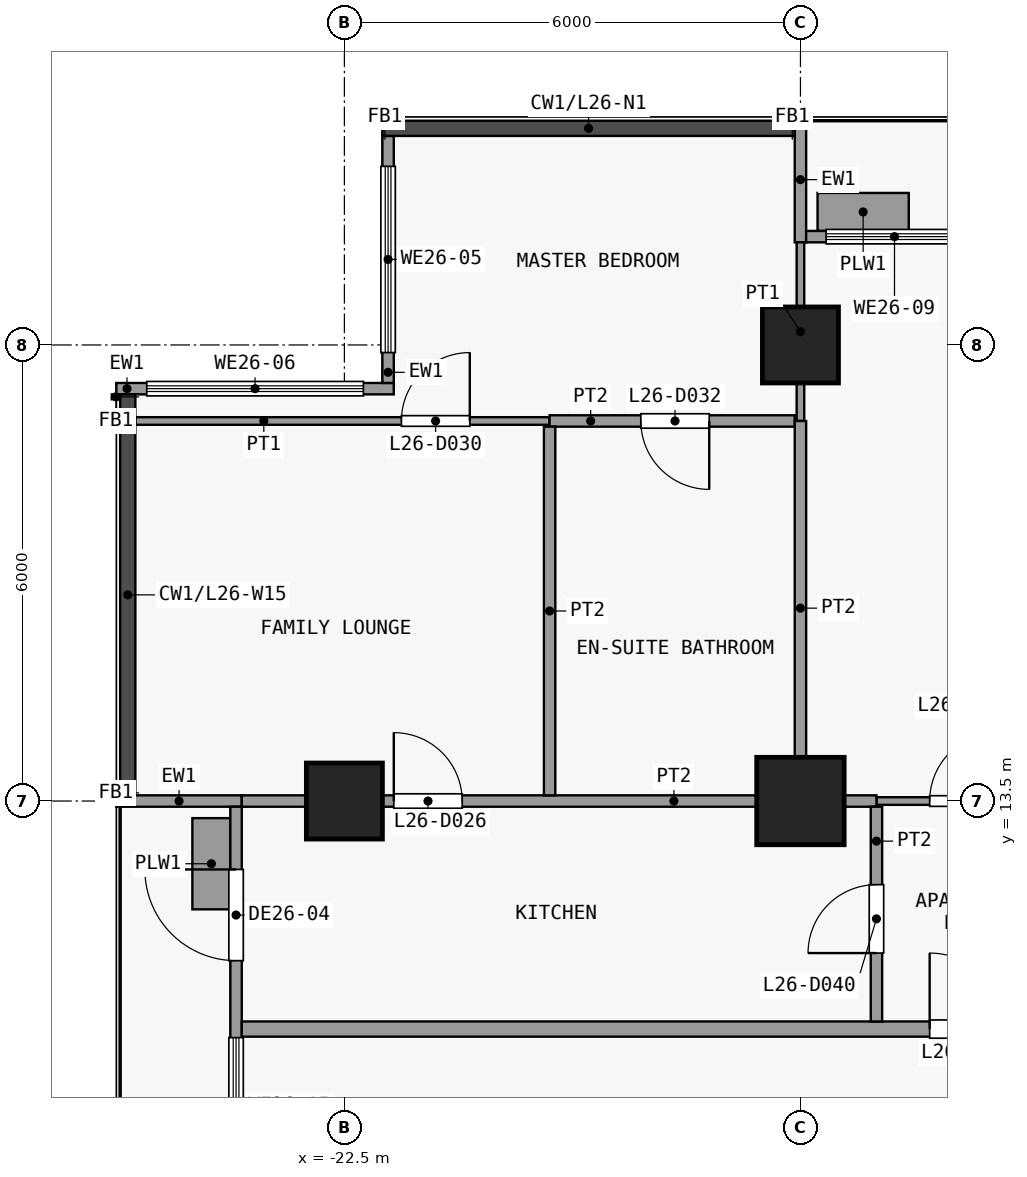
"""IFC4 building model, lengths in metres.
Left out: names, types, materials, properties, quantities, classifications, styles, units other than length and angle.
Written with IfcOpenShell. Run it as: python <this file> out.ifc"""

import sys

from ifc_helpers import new_model, si_unit, direction, frame, frame_2d, origin, origin_2d, place, context, subcontext, project, spatial, rectangle, extrude, element, fill, save


model = new_model("IFC4")
c1 = context("Model", 3, precision=1e-05, world=origin(), true_north=direction((0.0, 1.0)))
c2 = subcontext(c1, "Body", "Model", "MODEL_VIEW")
j1 = project(units=[si_unit("LENGTHUNIT", "METRE"), si_unit("PLANEANGLEUNIT", "RADIAN")], contexts=[c1])
p1 = place(None, origin())
s1 = spatial("IfcSite", under=j1, at=p1, CompositionType="ELEMENT")
p2 = place(p1, origin())
s2 = spatial("IfcBuilding", under=s1, at=p2, CompositionType="ELEMENT")
p3 = place(p2, frame((0.0, 0.0, 106.3)))
s3 = spatial("IfcBuildingStorey", under=s2, at=p3, CompositionType="ELEMENT", Elevation=106.3)
p4 = place(p3, frame((-22.5, 13.5, 0.0), z_axis=(0.0, 0.0, 1.0), x_axis=(1.0, 0.0, 0.0)))
e1 = element("IfcColumn", 1, at=p4, inside=s3, PredefinedType="COLUMN", context=c2, shape_type="SweptSolid", body=[
    extrude(rectangle(XDim=1.0, YDim=1.0, at=origin_2d()), origin(), (0.0, 0.0, 1.0), 3.6),
])
p5 = place(p3, frame((-16.5, 13.5, 0.0), z_axis=(0.0, 0.0, 1.0), x_axis=(1.0, 0.0, 0.0)))
e2 = element("IfcColumn", 2, at=p5, inside=s3, PredefinedType="COLUMN", context=c2, shape_type="SweptSolid", body=[
    extrude(rectangle(XDim=1.15, YDim=1.15, at=origin_2d()), origin(), (0.0, 0.0, 1.0), 3.6),
])
p6 = place(p3, frame((-16.5, 19.5, 0.0), z_axis=(0.0, 0.0, 1.0), x_axis=(1.0, 0.0, 0.0)))
e3 = element("IfcColumn", 3, at=p6, inside=s3, PredefinedType="COLUMN", context=c2, shape_type="SweptSolid", body=[
    extrude(rectangle(XDim=1.0, YDim=1.0, at=origin_2d()), origin(), (0.0, 0.0, 1.0), 3.6),
])
p7 = place(p3, frame((-21.925, 19.0, 0.0), z_axis=(0.0, 0.0, 1.0), x_axis=(0.0, 1.0, 0.0)))
e4 = element("IfcWall", 4, at=p7, inside=s3, PredefinedType="SOLIDWALL", context=c2, shape_type="SweptSolid", body=[
    extrude(rectangle(XDim=3.25, YDim=0.15, at=frame_2d((1.625, 0.0))), origin(), (0.0, 0.0, 1.0), 3.3),
])
p8 = place(p7, frame((0.4, 0.0, 0.9)))
e5 = element("IfcOpeningElement", 5, at=p8, cuts=e4, PredefinedType="OPENING", context=c2, shape_type="SweptSolid", body=[
    extrude(rectangle(XDim=2.45, YDim=2.4, at=frame_2d((1.225, 1.2))), frame((0.0, 0.085, 0.0), z_axis=(0.0, -1.0, 0.0), x_axis=(1.0, 0.0, 0.0)), (0.0, 0.0, 1.0), 0.17),
])
p9 = place(p3, frame((-25.5, 18.925, 0.0), z_axis=(0.0, 0.0, 1.0), x_axis=(1.0, 0.0, 0.0)))
e6 = element("IfcWall", 6, at=p9, inside=s3, PredefinedType="SOLIDWALL", context=c2, shape_type="SweptSolid", body=[
    extrude(rectangle(XDim=3.65, YDim=0.15, at=frame_2d((1.825, 0.0))), origin(), (0.0, 0.0, 1.0), 3.3),
])
p10 = place(p9, frame((0.4, 0.0, 0.9)))
e7 = element("IfcOpeningElement", 7, at=p10, cuts=e6, PredefinedType="OPENING", context=c2, shape_type="SweptSolid", body=[
    extrude(rectangle(XDim=2.85, YDim=2.4, at=frame_2d((1.425, 1.2))), frame((0.0, 0.085, 0.0), z_axis=(0.0, -1.0, 0.0), x_axis=(1.0, 0.0, 0.0)), (0.0, 0.0, 1.0), 0.17),
])
p11 = place(p3, frame((-16.5, 20.85, 0.0), z_axis=(0.0, 0.0, 1.0), x_axis=(0.0, 1.0, 0.0)))
e8 = element("IfcWall", 8, at=p11, inside=s3, PredefinedType="SOLIDWALL", context=c2, shape_type="SweptSolid", body=[
    extrude(rectangle(XDim=1.65, YDim=0.15, at=frame_2d((0.825, 0.0))), origin(), (0.0, 0.0, 1.0), 3.3),
])
p12 = place(p3, frame((-16.425, 20.925, 0.0), z_axis=(0.0, 0.0, 1.0), x_axis=(1.0, 0.0, 0.0)))
e9 = element("IfcWall", 9, at=p12, inside=s3, PredefinedType="SOLIDWALL", context=c2, shape_type="SweptSolid", body=[
    extrude(rectangle(XDim=5.85, YDim=0.15, at=frame_2d((2.925, 0.0))), origin(), (0.0, 0.0, 1.0), 3.3),
])
p13 = place(p12, frame((2.325, 0.0, 0.0)))
e10 = element("IfcOpeningElement", 10, at=p13, cuts=e9, PredefinedType="OPENING", context=c2, shape_type="SweptSolid", body=[
    extrude(rectangle(XDim=1.2, YDim=2.4, at=frame_2d((0.6, 1.2))), frame((0.0, 0.085, 0.0), z_axis=(0.0, -1.0, 0.0), x_axis=(1.0, 0.0, 0.0)), (0.0, 0.0, 1.0), 0.17),
])
p14 = place(p12, frame((0.262, 0.0, 0.9)))
e11 = element("IfcOpeningElement", 11, at=p14, cuts=e9, PredefinedType="OPENING", context=c2, shape_type="SweptSolid", body=[
    extrude(rectangle(XDim=1.8, YDim=2.1, at=frame_2d((0.9, 1.05))), frame((0.0, 0.085, 0.0), z_axis=(0.0, -1.0, 0.0), x_axis=(1.0, 0.0, 0.0)), (0.0, 0.0, 1.0), 0.17),
])
p15 = place(p12, frame((3.788, 0.0, 0.9)))
e12 = element("IfcOpeningElement", 12, at=p15, cuts=e9, PredefinedType="OPENING", context=c2, shape_type="SweptSolid", body=[
    extrude(rectangle(XDim=1.8, YDim=2.1, at=frame_2d((0.9, 1.05))), frame((0.0, 0.085, 0.0), z_axis=(0.0, -1.0, 0.0), x_axis=(1.0, 0.0, 0.0)), (0.0, 0.0, 1.0), 0.17),
])
p16 = place(p3, frame((-16.275, 21.25, 0.0), z_axis=(0.0, 0.0, 1.0), x_axis=(1.0, 0.0, 0.0)))
e13 = element("IfcWall", 13, at=p16, inside=s3, PredefinedType="USERDEFINED", context=c2, shape_type="SweptSolid", body=[
    extrude(rectangle(XDim=1.2, YDim=0.5, at=frame_2d((0.6, 0.0))), origin(), (0.0, 0.0, 1.0), 0.9),
])
p17 = place(p3, frame((-23.85, 13.5, 0.0), z_axis=(0.0, 0.0, 1.0), x_axis=(-1.0, 0.0, 0.0)))
e14 = element("IfcWall", 14, at=p17, inside=s3, PredefinedType="SOLIDWALL", context=c2, shape_type="SweptSolid", body=[
    extrude(rectangle(XDim=1.65, YDim=0.15, at=frame_2d((0.825, 0.0))), origin(), (0.0, 0.0, 1.0), 3.3),
])
p18 = place(p3, frame((-23.925, 7.575, 0.0), z_axis=(0.0, 0.0, 1.0), x_axis=(0.0, 1.0, 0.0)))
e15 = element("IfcWall", 15, at=p18, inside=s3, PredefinedType="SOLIDWALL", context=c2, shape_type="SweptSolid", body=[
    extrude(rectangle(XDim=5.85, YDim=0.15, at=frame_2d((2.925, 0.0))), origin(), (0.0, 0.0, 1.0), 3.3),
])
p19 = place(p18, frame((3.825, 0.0, 0.0)))
e16 = element("IfcOpeningElement", 16, at=p19, cuts=e15, PredefinedType="OPENING", context=c2, shape_type="SweptSolid", body=[
    extrude(rectangle(XDim=1.2, YDim=2.4, at=frame_2d((0.6, 1.2))), frame((0.0, 0.085, 0.0), z_axis=(0.0, -1.0, 0.0), x_axis=(1.0, 0.0, 0.0)), (0.0, 0.0, 1.0), 0.17),
])
p20 = place(p18, frame((1.012, 0.0, 0.9)))
e17 = element("IfcOpeningElement", 17, at=p20, cuts=e15, PredefinedType="OPENING", context=c2, shape_type="SweptSolid", body=[
    extrude(rectangle(XDim=1.8, YDim=2.1, at=frame_2d((0.9, 1.05))), frame((0.0, 0.085, 0.0), z_axis=(0.0, -1.0, 0.0), x_axis=(1.0, 0.0, 0.0)), (0.0, 0.0, 1.0), 0.17),
])
p21 = place(p3, frame((-24.25, 12.075, 0.0), z_axis=(0.0, 0.0, 1.0), x_axis=(0.0, 1.0, 0.0)))
e18 = element("IfcWall", 18, at=p21, inside=s3, PredefinedType="USERDEFINED", context=c2, shape_type="SweptSolid", body=[
    extrude(rectangle(XDim=1.2, YDim=0.5, at=frame_2d((0.6, 0.0))), origin(), (0.0, 0.0, 1.0), 0.9),
])
p22 = place(p3, frame((-23.85, 10.5, 0.0), z_axis=(0.0, 0.0, 1.0), x_axis=(1.0, 0.0, 0.0)))
e19 = element("IfcWall", 19, at=p22, inside=s3, PredefinedType="PARTITIONING", context=c2, shape_type="SweptSolid", body=[
    extrude(rectangle(XDim=50.1, YDim=0.2, at=frame_2d((25.05, 0.0))), origin(), (0.0, 0.0, 1.0), 3.3),
])
p23 = place(p22, frame((9.05, 0.0, 0.0)))
e20 = element("IfcOpeningElement", 20, at=p23, cuts=e19, PredefinedType="OPENING", context=c2, shape_type="SweptSolid", body=[
    extrude(rectangle(XDim=1.0, YDim=2.1, at=frame_2d((0.5, 1.05))), frame((0.0, 0.11, 0.0), z_axis=(0.0, -1.0, 0.0), x_axis=(1.0, 0.0, 0.0)), (0.0, 0.0, 1.0), 0.22),
])
p24 = place(p22, frame((14.05, 0.0, 0.0)))
e21 = element("IfcOpeningElement", 21, at=p24, cuts=e19, PredefinedType="OPENING", context=c2, shape_type="SweptSolid", body=[
    extrude(rectangle(XDim=1.0, YDim=2.1, at=frame_2d((0.5, 1.05))), frame((0.0, 0.11, 0.0), z_axis=(0.0, -1.0, 0.0), x_axis=(1.0, 0.0, 0.0)), (0.0, 0.0, 1.0), 0.22),
])
p25 = place(p22, frame((29.05, 0.0, 0.0)))
e22 = element("IfcOpeningElement", 22, at=p25, cuts=e19, PredefinedType="OPENING", context=c2, shape_type="SweptSolid", body=[
    extrude(rectangle(XDim=1.0, YDim=2.1, at=frame_2d((0.5, 1.05))), frame((0.0, 0.11, 0.0), z_axis=(0.0, -1.0, 0.0), x_axis=(1.0, 0.0, 0.0)), (0.0, 0.0, 1.0), 0.22),
])
p26 = place(p22, frame((41.05, 0.0, 0.0)))
e23 = element("IfcOpeningElement", 23, at=p26, cuts=e19, PredefinedType="OPENING", context=c2, shape_type="SweptSolid", body=[
    extrude(rectangle(XDim=1.0, YDim=2.1, at=frame_2d((0.5, 1.05))), frame((0.0, 0.11, 0.0), z_axis=(0.0, -1.0, 0.0), x_axis=(1.0, 0.0, 0.0)), (0.0, 0.0, 1.0), 0.22),
])
p27 = place(p3, frame((-15.5, 13.5, 0.0), z_axis=(0.0, 0.0, 1.0), x_axis=(1.0, 0.0, 0.0)))
e24 = element("IfcWall", 24, at=p27, inside=s3, PredefinedType="PARTITIONING", context=c2, shape_type="SweptSolid", body=[
    extrude(rectangle(XDim=2.4, YDim=0.1, at=frame_2d((1.2, 0.0))), origin(), (0.0, 0.0, 1.0), 3.3),
])
p28 = place(p27, frame((0.7, 0.0, 0.0)))
e25 = element("IfcOpeningElement", 25, at=p28, cuts=e24, PredefinedType="OPENING", context=c2, shape_type="SweptSolid", body=[
    extrude(rectangle(XDim=0.9, YDim=2.1, at=frame_2d((0.45, 1.05))), frame((0.0, 0.06, 0.0), z_axis=(0.0, -1.0, 0.0), x_axis=(1.0, 0.0, 0.0)), (0.0, 0.0, 1.0), 0.12),
])
p29 = place(p3, frame((-23.85, 13.5, 0.0), z_axis=(0.0, 0.0, 1.0), x_axis=(1.0, 0.0, 0.0)))
e26 = element("IfcWall", 26, at=p29, inside=s3, PredefinedType="PARTITIONING", context=c2, shape_type="SweptSolid", body=[
    extrude(rectangle(XDim=8.35, YDim=0.15, at=frame_2d((4.175, 0.0))), origin(), (0.0, 0.0, 1.0), 3.3),
])
p30 = place(p29, frame((2.0, 0.0, 0.0)))
e27 = element("IfcOpeningElement", 27, at=p30, cuts=e26, PredefinedType="OPENING", context=c2, shape_type="SweptSolid", body=[
    extrude(rectangle(XDim=0.9, YDim=2.1, at=frame_2d((0.45, 1.05))), frame((0.0, 0.085, 0.0), z_axis=(0.0, -1.0, 0.0), x_axis=(1.0, 0.0, 0.0)), (0.0, 0.0, 1.0), 0.17),
])
p31 = place(p3, frame((-25.25, 18.5, 0.0), z_axis=(0.0, 0.0, 1.0), x_axis=(1.0, 0.0, 0.0)))
e28 = element("IfcWall", 28, at=p31, inside=s3, PredefinedType="PARTITIONING", context=c2, shape_type="SweptSolid", body=[
    extrude(rectangle(XDim=5.45, YDim=0.1, at=frame_2d((2.725, 0.0))), origin(), (0.0, 0.0, 1.0), 3.3),
])
p32 = place(p31, frame((3.5, 0.0, 0.0)))
e29 = element("IfcOpeningElement", 29, at=p32, cuts=e28, PredefinedType="OPENING", context=c2, shape_type="SweptSolid", body=[
    extrude(rectangle(XDim=0.9, YDim=2.1, at=frame_2d((0.45, 1.05))), frame((0.0, 0.06, 0.0), z_axis=(0.0, -1.0, 0.0), x_axis=(1.0, 0.0, 0.0)), (0.0, 0.0, 1.0), 0.12),
])
p33 = place(p3, frame((-19.8, 18.5, 0.0), z_axis=(0.0, 0.0, 1.0), x_axis=(1.0, 0.0, 0.0)))
e30 = element("IfcWall", 30, at=p33, inside=s3, PredefinedType="PARTITIONING", context=c2, shape_type="SweptSolid", body=[
    extrude(rectangle(XDim=3.225, YDim=0.15, at=frame_2d((1.613, 0.0))), origin(), (0.0, 0.0, 1.0), 3.3),
])
p34 = place(p33, frame((1.2, 0.0, 0.0)))
e31 = element("IfcOpeningElement", 31, at=p34, cuts=e30, PredefinedType="OPENING", context=c2, shape_type="SweptSolid", body=[
    extrude(rectangle(XDim=0.9, YDim=2.1, at=frame_2d((0.45, 1.05))), frame((0.0, 0.085, 0.0), z_axis=(0.0, -1.0, 0.0), x_axis=(1.0, 0.0, 0.0)), (0.0, 0.0, 1.0), 0.17),
])
p35 = place(p3, frame((-19.8, 13.575, 0.0), z_axis=(0.0, 0.0, 1.0), x_axis=(0.0, 1.0, 0.0)))
e32 = element("IfcWall", 32, at=p35, inside=s3, PredefinedType="PARTITIONING", context=c2, shape_type="SweptSolid", body=[
    extrude(rectangle(XDim=4.85, YDim=0.15, at=frame_2d((2.425, 0.0))), origin(), (0.0, 0.0, 1.0), 3.3),
])
p36 = place(p3, frame((-16.5, 18.5, 0.0), z_axis=(0.0, 0.0, 1.0), x_axis=(0.0, 1.0, 0.0)))
e33 = element("IfcWall", 33, at=p36, inside=s3, PredefinedType="PARTITIONING", context=c2, shape_type="SweptSolid", body=[
    extrude(rectangle(XDim=2.35, YDim=0.1, at=frame_2d((1.175, 0.0))), origin(), (0.0, 0.0, 1.0), 3.3),
])
p37 = place(p3, frame((-16.5, 13.575, 0.0), z_axis=(0.0, 0.0, 1.0), x_axis=(0.0, 1.0, 0.0)))
e34 = element("IfcWall", 34, at=p37, inside=s3, PredefinedType="PARTITIONING", context=c2, shape_type="SweptSolid", body=[
    extrude(rectangle(XDim=4.925, YDim=0.15, at=frame_2d((2.462, 0.0))), origin(), (0.0, 0.0, 1.0), 3.3),
])
p38 = place(p3, frame((-15.5, 10.6, 0.0), z_axis=(0.0, 0.0, 1.0), x_axis=(0.0, 1.0, 0.0)))
e35 = element("IfcWall", 35, at=p38, inside=s3, PredefinedType="PARTITIONING", context=c2, shape_type="SweptSolid", body=[
    extrude(rectangle(XDim=2.825, YDim=0.15, at=frame_2d((1.413, 0.0))), origin(), (0.0, 0.0, 1.0), 3.3),
])
p39 = place(p38, frame((0.9, 0.0, 0.0)))
e36 = element("IfcOpeningElement", 36, at=p39, cuts=e35, PredefinedType="OPENING", context=c2, shape_type="SweptSolid", body=[
    extrude(rectangle(XDim=0.9, YDim=2.1, at=frame_2d((0.45, 1.05))), frame((0.0, 0.085, 0.0), z_axis=(0.0, -1.0, 0.0), x_axis=(1.0, 0.0, 0.0)), (0.0, 0.0, 1.0), 0.17),
])
p40 = place(p8, origin())
e37 = element("IfcWindow", 37, at=p40, inside=s3, PartitioningType="SINGLE_PANEL", PredefinedType="WINDOW", context=c2, shape_type="SweptSolid", body=[
    extrude(rectangle(XDim=2.45, YDim=2.4, at=frame_2d((1.225, 1.2))), frame((0.0, 0.03, 0.0), z_axis=(0.0, -1.0, 0.0), x_axis=(1.0, 0.0, 0.0)), (0.0, 0.0, 1.0), 0.06),
])
fill(e5, e37)
p41 = place(p10, origin())
e38 = element("IfcWindow", 38, at=p41, inside=s3, PartitioningType="SINGLE_PANEL", PredefinedType="WINDOW", context=c2, shape_type="SweptSolid", body=[
    extrude(rectangle(XDim=2.85, YDim=2.4, at=frame_2d((1.425, 1.2))), frame((0.0, 0.03, 0.0), z_axis=(0.0, -1.0, 0.0), x_axis=(1.0, 0.0, 0.0)), (0.0, 0.0, 1.0), 0.06),
])
fill(e7, e38)
p42 = place(p14, origin())
e39 = element("IfcWindow", 39, at=p42, inside=s3, PartitioningType="SINGLE_PANEL", PredefinedType="WINDOW", context=c2, shape_type="SweptSolid", body=[
    extrude(rectangle(XDim=1.8, YDim=2.1, at=frame_2d((0.9, 1.05))), frame((0.0, 0.03, 0.0), z_axis=(0.0, -1.0, 0.0), x_axis=(1.0, 0.0, 0.0)), (0.0, 0.0, 1.0), 0.06),
])
fill(e11, e39)
p43 = place(p19, origin())
e40 = element("IfcDoor", 40, at=p43, inside=s3, OperationType="SINGLE_SWING_RIGHT", PredefinedType="DOOR", context=c2, shape_type="SweptSolid", body=[
    extrude(rectangle(XDim=1.2, YDim=2.4, at=frame_2d((0.6, 1.2))), frame((0.0, 0.025, 0.0), z_axis=(0.0, -1.0, 0.0), x_axis=(1.0, 0.0, 0.0)), (0.0, 0.0, 1.0), 0.05),
])
fill(e16, e40)
p44 = place(p20, origin())
e41 = element("IfcWindow", 41, at=p44, inside=s3, PartitioningType="SINGLE_PANEL", PredefinedType="WINDOW", context=c2, shape_type="SweptSolid", body=[
    extrude(rectangle(XDim=1.8, YDim=2.1, at=frame_2d((0.9, 1.05))), frame((0.0, 0.03, 0.0), z_axis=(0.0, -1.0, 0.0), x_axis=(1.0, 0.0, 0.0)), (0.0, 0.0, 1.0), 0.06),
])
fill(e17, e41)
p45 = place(p23, origin())
e42 = element("IfcDoor", 42, at=p45, inside=s3, OperationType="SINGLE_SWING_RIGHT", PredefinedType="DOOR", context=c2, shape_type="SweptSolid", body=[
    extrude(rectangle(XDim=1.0, YDim=2.1, at=frame_2d((0.5, 1.05))), frame((0.0, 0.025, 0.0), z_axis=(0.0, -1.0, 0.0), x_axis=(1.0, 0.0, 0.0)), (0.0, 0.0, 1.0), 0.05),
])
fill(e20, e42)
p46 = place(p28, origin())
e43 = element("IfcDoor", 43, at=p46, inside=s3, OperationType="SINGLE_SWING_LEFT", PredefinedType="DOOR", context=c2, shape_type="SweptSolid", body=[
    extrude(rectangle(XDim=0.9, YDim=2.1, at=frame_2d((0.45, 1.05))), frame((0.0, 0.025, 0.0), z_axis=(0.0, -1.0, 0.0), x_axis=(1.0, 0.0, 0.0)), (0.0, 0.0, 1.0), 0.05),
])
fill(e25, e43)
p47 = place(p30, origin())
e44 = element("IfcDoor", 44, at=p47, inside=s3, OperationType="SINGLE_SWING_RIGHT", PredefinedType="DOOR", context=c2, shape_type="SweptSolid", body=[
    extrude(rectangle(XDim=0.9, YDim=2.1, at=frame_2d((0.45, 1.05))), frame((0.0, 0.025, 0.0), z_axis=(0.0, -1.0, 0.0), x_axis=(1.0, 0.0, 0.0)), (0.0, 0.0, 1.0), 0.05),
])
fill(e27, e44)
p48 = place(p32, origin())
e45 = element("IfcDoor", 45, at=p48, inside=s3, OperationType="SINGLE_SWING_LEFT", PredefinedType="DOOR", context=c2, shape_type="SweptSolid", body=[
    extrude(rectangle(XDim=0.9, YDim=2.1, at=frame_2d((0.45, 1.05))), frame((0.0, 0.025, 0.0), z_axis=(0.0, -1.0, 0.0), x_axis=(1.0, 0.0, 0.0)), (0.0, 0.0, 1.0), 0.05),
])
fill(e29, e45)
p49 = place(p34, origin())
e46 = element("IfcDoor", 46, at=p49, inside=s3, OperationType="SINGLE_SWING_RIGHT", PredefinedType="DOOR", context=c2, shape_type="SweptSolid", body=[
    extrude(rectangle(XDim=0.9, YDim=2.1, at=frame_2d((0.45, 1.05))), frame((0.0, 0.025, 0.0), z_axis=(0.0, -1.0, 0.0), x_axis=(1.0, 0.0, 0.0)), (0.0, 0.0, 1.0), 0.05),
])
fill(e31, e46)
p50 = place(p39, origin())
e47 = element("IfcDoor", 47, at=p50, inside=s3, OperationType="SINGLE_SWING_RIGHT", PredefinedType="DOOR", context=c2, shape_type="SweptSolid", body=[
    extrude(rectangle(XDim=0.9, YDim=2.1, at=frame_2d((0.45, 1.05))), frame((0.0, 0.025, 0.0), z_axis=(0.0, -1.0, 0.0), x_axis=(1.0, 0.0, 0.0)), (0.0, 0.0, 1.0), 0.05),
])
fill(e36, e47)
save(model, sys.argv[1])
